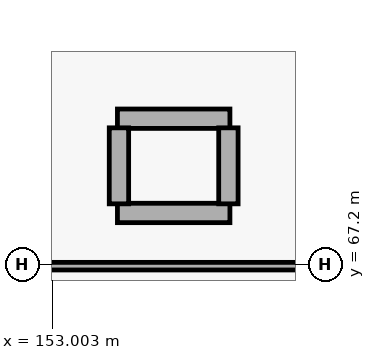
"""IFC4 building model, lengths in metres.
Left out: names, types, materials, properties, quantities, classifications, styles, units other than length and angle.
Written with IfcOpenShell. Run it as: python <this file> out.ifc"""

import sys

from ifc_helpers import new_model, si_unit, direction, frame, frame_2d, origin, place, context, subcontext, project, spatial, rectangle, extrude, element, save


model = new_model("IFC4")
c1 = context("Model", 3, precision=1e-05, world=origin(), true_north=direction((0.0, 1.0)))
c2 = subcontext(c1, "Body", "Model", "MODEL_VIEW")
j1 = project(units=[si_unit("LENGTHUNIT", "METRE"), si_unit("PLANEANGLEUNIT", "RADIAN")], contexts=[c1])
p1 = place(None, origin())
s1 = spatial("IfcSite", under=j1, at=p1, CompositionType="ELEMENT")
p2 = place(p1, origin())
s2 = spatial("IfcBuilding", under=s1, at=p2, CompositionType="ELEMENT")
p3 = place(p2, frame((0.0, 0.0, 15.6)))
s3 = spatial("IfcBuildingStorey", under=s2, at=p3, CompositionType="ELEMENT", Elevation=15.6)
for number, where, z_axis, x_axis in (
    (1, (153.86, 69.12, 0.0), (0.0, 0.0, 1.0), (1.0, 0.0, 0.0)),
    (2, (153.86, 67.88, 0.0), (0.0, 0.0, 1.0), (1.0, 0.0, 0.0)),
):
    element("IfcWall", number, at=place(p3, frame(where, z_axis=z_axis, x_axis=x_axis)), inside=s3, PredefinedType="PARTITIONING", context=c2, shape_type="SweptSolid", body=[
        extrude(rectangle(XDim=1.48, YDim=0.255, at=frame_2d((0.74, 0.0))), origin(), (0.0, 0.0, 1.0), 4.44),
    ])
p4 = place(p3, frame((153.88, 68.0, 0.0), z_axis=(0.0, 0.0, 1.0), x_axis=(0.0, 1.0, 0.0)))
e3 = element("IfcWall", 3, at=p4, inside=s3, PredefinedType="PARTITIONING", context=c2, shape_type="SweptSolid", body=[
    extrude(rectangle(XDim=1.0, YDim=0.255, at=frame_2d((0.5, 0.0))), origin(), (0.0, 0.0, 1.0), 4.72),
])
p5 = place(p3, frame((155.32, 68.0, 0.0), z_axis=(0.0, 0.0, 1.0), x_axis=(0.0, 1.0, 0.0)))
e4 = element("IfcWall", 4, at=p5, inside=s3, PredefinedType="PARTITIONING", context=c2, shape_type="SweptSolid", body=[
    extrude(rectangle(XDim=1.0, YDim=0.255, at=frame_2d((0.5, 0.0))), origin(), (0.0, 0.0, 1.0), 4.44),
])
p6 = place(p3, frame((142.43, 67.18, 0.0), z_axis=(0.0, 0.0, 1.0), x_axis=(1.0, 0.0, 0.0)))
e5 = element("IfcWall", 5, at=p6, inside=s3, PredefinedType="PARTITIONING", context=c2, shape_type="SweptSolid", body=[
    extrude(rectangle(XDim=23.14, YDim=0.1, at=frame_2d((11.57, 0.0))), origin(), (0.0, 0.0, 1.0), 3.81),
])
p7 = place(p6, frame((18.9, 0.0, 0.0)))
e6 = element("IfcOpeningElement", 6, at=p7, cuts=e5, PredefinedType="OPENING", context=c2, shape_type="SweptSolid", body=[
    extrude(rectangle(XDim=2.52, YDim=2.8, at=frame_2d((1.26, 1.4))), frame((0.0, 0.06, 0.0), z_axis=(0.0, -1.0, 0.0), x_axis=(1.0, 0.0, 0.0)), (0.0, 0.0, 1.0), 0.12),
])
save(model, sys.argv[1])
